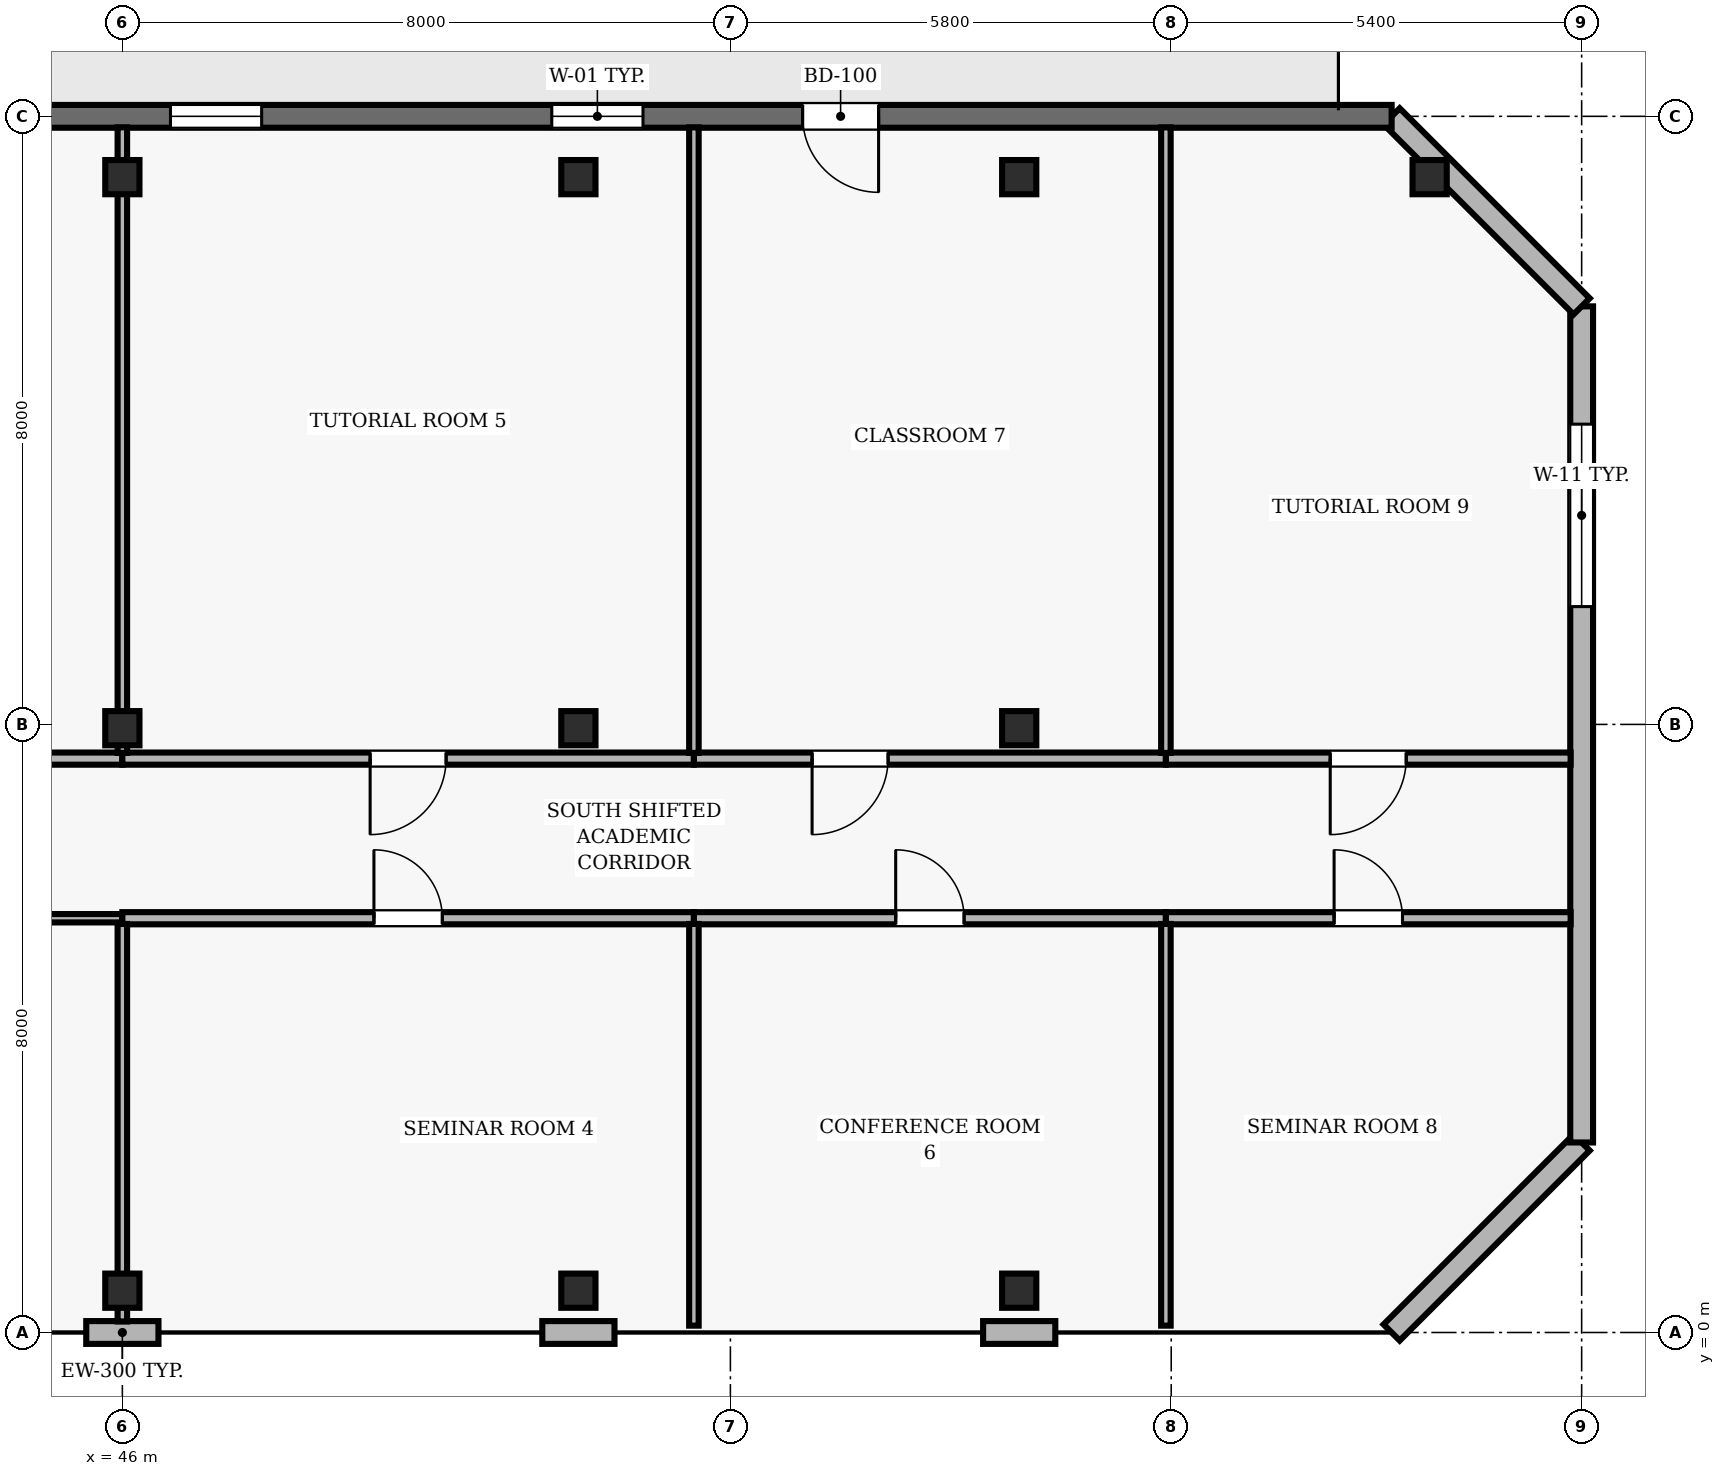
"""IFC4 building model, lengths in metres.
Left out: names, types, materials, properties, quantities, classifications, styles, units other than length and angle.
Written with IfcOpenShell. Run it as: python <this file> out.ifc"""

import sys

from ifc_helpers import new_model, si_unit, direction, frame, frame_2d, origin, origin_2d, place, context, subcontext, project, spatial, rectangle, hollow_rectangle, extrude, element, fill, save


model = new_model("IFC4")
c1 = context("Model", 3, precision=1e-05, world=origin(), true_north=direction((0.0, 1.0)))
c2 = subcontext(c1, "Body", "Model", "MODEL_VIEW")
j1 = project(units=[si_unit("LENGTHUNIT", "METRE"), si_unit("PLANEANGLEUNIT", "RADIAN")], contexts=[c1])
p1 = place(None, origin())
s1 = spatial("IfcSite", under=j1, at=p1, CompositionType="ELEMENT")
p2 = place(p1, origin())
s2 = spatial("IfcBuilding", under=s1, at=p2, CompositionType="ELEMENT")
p3 = place(p2, frame((0.0, 0.0, 230.4)))
s3 = spatial("IfcBuildingStorey", under=s2, at=p3, CompositionType="ELEMENT", Elevation=230.4)
for number, where, z_axis, x_axis in (
    (1, (46.0, 0.55, 0.0), (0.0, 0.0, 1.0), (1.0, 0.0, 0.0)),
    (2, (46.0, 7.95, 0.0), (0.0, 0.0, 1.0), (1.0, 0.0, 0.0)),
    (3, (46.0, 15.2, 0.0), (0.0, 0.0, 1.0), (1.0, 0.0, 0.0)),
    (4, (52.0, 0.55, 0.0), (0.0, 0.0, 1.0), (1.0, 0.0, 0.0)),
    (5, (52.0, 7.95, 0.0), (0.0, 0.0, 1.0), (1.0, 0.0, 0.0)),
    (6, (52.0, 15.2, 0.0), (0.0, 0.0, 1.0), (1.0, 0.0, 0.0)),
    (7, (57.8, 0.55, 0.0), (0.0, 0.0, 1.0), (1.0, 0.0, 0.0)),
    (8, (57.8, 7.95, 0.0), (0.0, 0.0, 1.0), (1.0, 0.0, 0.0)),
    (9, (57.8, 15.2, 0.0), (0.0, 0.0, 1.0), (1.0, 0.0, 0.0)),
    (10, (63.2, 15.2, 0.0), (0.0, 0.0, 1.0), (1.0, 0.0, 0.0)),
):
    element("IfcColumn", number, at=place(p3, frame(where, z_axis=z_axis, x_axis=x_axis)), inside=s3, PredefinedType="COLUMN", context=c2, shape_type="SweptSolid", body=[
        extrude(hollow_rectangle(XDim=0.45, YDim=0.45, WallThickness=0.02, at=origin_2d()), origin(), (0.0, 0.0, 1.0), 3.9),
    ])
for number, where, z_axis, x_axis in (
    (11, (45.525, 0.0, 0.0), (0.0, 0.0, 1.0), (1.0, 0.0, 0.0)),
    (12, (51.525, 0.0, 0.0), (0.0, 0.0, 1.0), (1.0, 0.0, 0.0)),
):
    element("IfcWall", number, at=place(p3, frame(where, z_axis=z_axis, x_axis=x_axis)), inside=s3, PredefinedType="SOLIDWALL", context=c2, shape_type="SweptSolid", body=[
        extrude(rectangle(XDim=0.95, YDim=0.3, at=frame_2d((0.475, 0.0))), origin(), (0.0, 0.0, 1.0), 3.69),
    ])
p4 = place(p3, frame((57.325, 0.0, 0.0), z_axis=(0.0, 0.0, 1.0), x_axis=(1.0, 0.0, 0.0)))
e13 = element("IfcWall", 13, at=p4, inside=s3, PredefinedType="SOLIDWALL", context=c2, shape_type="SweptSolid", body=[
    extrude(rectangle(XDim=0.95, YDim=0.3, at=frame_2d((0.475, 0.0))), origin(), (0.0, 0.0, 1.0), 3.69),
])
p5 = place(p3, frame((62.7, 0.0, 0.0), z_axis=(0.0, 0.0, 1.0), x_axis=(0.707106781187, 0.707106781187, 0.0)))
e14 = element("IfcWall", 14, at=p5, inside=s3, PredefinedType="SOLIDWALL", context=c2, shape_type="SweptSolid", body=[
    extrude(rectangle(XDim=3.536, YDim=0.3, at=frame_2d((1.768, 0.0))), origin(), (0.0, 0.0, 1.0), 3.69),
])
p6 = place(p3, frame((65.2, 2.5, 0.0), z_axis=(0.0, 0.0, 1.0), x_axis=(0.0, 1.0, 0.0)))
e15 = element("IfcWall", 15, at=p6, inside=s3, PredefinedType="SOLIDWALL", context=c2, shape_type="SweptSolid", body=[
    extrude(rectangle(XDim=11.0, YDim=0.3, at=frame_2d((5.5, 0.0))), origin(), (0.0, 0.0, 1.0), 3.69),
])
p7 = place(p6, frame((7.05, 0.0, 0.9)))
e16 = element("IfcOpeningElement", 16, at=p7, cuts=e15, PredefinedType="OPENING", context=c2, shape_type="SweptSolid", body=[
    extrude(rectangle(XDim=2.4, YDim=2.2, at=frame_2d((1.2, 1.1))), frame((0.0, 0.16, 0.0), z_axis=(0.0, -1.0, 0.0), x_axis=(1.0, 0.0, 0.0)), (0.0, 0.0, 1.0), 0.32),
])
p8 = place(p3, frame((65.2, 13.5, 0.0), z_axis=(0.0, 0.0, 1.0), x_axis=(-0.707106781187, 0.707106781187, 0.0)))
e17 = element("IfcWall", 17, at=p8, inside=s3, PredefinedType="SOLIDWALL", context=c2, shape_type="SweptSolid", body=[
    extrude(rectangle(XDim=3.536, YDim=0.3, at=frame_2d((1.768, 0.0))), origin(), (0.0, 0.0, 1.0), 3.69),
])
p9 = place(p3, frame((62.7, 16.0, 0.0), z_axis=(0.0, 0.0, 1.0), x_axis=(-1.0, 0.0, 0.0)))
e18 = element("IfcWall", 18, at=p9, inside=s3, PredefinedType="SOLIDWALL", context=c2, shape_type="SweptSolid", body=[
    extrude(rectangle(XDim=19.1, YDim=0.3, at=frame_2d((9.55, 0.0))), origin(), (0.0, 0.0, 1.0), 3.69),
])
p10 = place(p9, frame((6.75, 0.0, 0.0)))
e19 = element("IfcOpeningElement", 19, at=p10, cuts=e18, PredefinedType="OPENING", context=c2, shape_type="SweptSolid", body=[
    extrude(rectangle(XDim=1.0, YDim=2.2, at=frame_2d((0.5, 1.1))), frame((0.0, 0.16, 0.0), z_axis=(0.0, -1.0, 0.0), x_axis=(1.0, 0.0, 0.0)), (0.0, 0.0, 1.0), 0.32),
])
p11 = place(p9, frame((9.85, 0.0, 0.9)))
e20 = element("IfcOpeningElement", 20, at=p11, cuts=e18, PredefinedType="OPENING", context=c2, shape_type="SweptSolid", body=[
    extrude(rectangle(XDim=1.2, YDim=1.6, at=frame_2d((0.6, 0.8))), frame((0.0, 0.16, 0.0), z_axis=(0.0, -1.0, 0.0), x_axis=(1.0, 0.0, 0.0)), (0.0, 0.0, 1.0), 0.32),
])
p12 = place(p9, frame((14.867, 0.0, 0.9)))
e21 = element("IfcOpeningElement", 21, at=p12, cuts=e18, PredefinedType="OPENING", context=c2, shape_type="SweptSolid", body=[
    extrude(rectangle(XDim=1.2, YDim=1.6, at=frame_2d((0.6, 0.8))), frame((0.0, 0.16, 0.0), z_axis=(0.0, -1.0, 0.0), x_axis=(1.0, 0.0, 0.0)), (0.0, 0.0, 1.0), 0.32),
])
p13 = place(p3, frame((40.35, 5.45, 0.0), z_axis=(0.0, 0.0, 1.0), x_axis=(1.0, 0.0, 0.0)))
e22 = element("IfcWall", 22, at=p13, inside=s3, PredefinedType="MOVABLE", context=c2, shape_type="SweptSolid", body=[
    extrude(rectangle(XDim=5.65, YDim=0.11, at=frame_2d((2.825, 0.0))), origin(), (0.0, 0.0, 1.0), 3.343),
])
p14 = place(p13, frame((2.375, 0.0, 0.0)))
e23 = element("IfcOpeningElement", 23, at=p14, cuts=e22, PredefinedType="OPENING", context=c2, shape_type="SweptSolid", body=[
    extrude(rectangle(XDim=0.9, YDim=2.1, at=frame_2d((0.45, 1.05))), frame((0.0, 0.065, 0.0), z_axis=(0.0, -1.0, 0.0), x_axis=(1.0, 0.0, 0.0)), (0.0, 0.0, 1.0), 0.13),
])
p15 = place(p3, frame((46.0, 5.45, 0.0), z_axis=(0.0, 0.0, 1.0), x_axis=(1.0, 0.0, 0.0)))
e24 = element("IfcWall", 24, at=p15, inside=s3, PredefinedType="PARTITIONING", context=c2, shape_type="SweptSolid", body=[
    extrude(rectangle(XDim=7.52, YDim=0.16, at=frame_2d((3.76, 0.0))), origin(), (0.0, 0.0, 1.0), 3.343),
])
p16 = place(p15, frame((3.31, 0.0, 0.0)))
e25 = element("IfcOpeningElement", 25, at=p16, cuts=e24, PredefinedType="OPENING", context=c2, shape_type="SweptSolid", body=[
    extrude(rectangle(XDim=0.9, YDim=2.1, at=frame_2d((0.45, 1.05))), frame((0.0, 0.09, 0.0), z_axis=(0.0, -1.0, 0.0), x_axis=(1.0, 0.0, 0.0)), (0.0, 0.0, 1.0), 0.18),
])
p17 = place(p3, frame((46.0, 7.55, 0.0), z_axis=(0.0, 0.0, 1.0), x_axis=(-1.0, 0.0, 0.0)))
e26 = element("IfcWall", 26, at=p17, inside=s3, PredefinedType="PARTITIONING", context=c2, shape_type="SweptSolid", body=[
    extrude(rectangle(XDim=5.65, YDim=0.16, at=frame_2d((2.825, 0.0))), origin(), (0.0, 0.0, 1.0), 3.139),
])
p18 = place(p3, frame((53.52, 5.45, 0.0), z_axis=(0.0, 0.0, 1.0), x_axis=(1.0, 0.0, 0.0)))
e27 = element("IfcWall", 27, at=p18, inside=s3, PredefinedType="PARTITIONING", context=c2, shape_type="SweptSolid", body=[
    extrude(rectangle(XDim=6.21, YDim=0.16, at=frame_2d((3.105, 0.0))), origin(), (0.0, 0.0, 1.0), 3.343),
])
p19 = place(p18, frame((2.655, 0.0, 0.0)))
e28 = element("IfcOpeningElement", 28, at=p19, cuts=e27, PredefinedType="OPENING", context=c2, shape_type="SweptSolid", body=[
    extrude(rectangle(XDim=0.9, YDim=2.1, at=frame_2d((0.45, 1.05))), frame((0.0, 0.09, 0.0), z_axis=(0.0, -1.0, 0.0), x_axis=(1.0, 0.0, 0.0)), (0.0, 0.0, 1.0), 0.18),
])
p20 = place(p3, frame((53.52, 7.55, 0.0), z_axis=(0.0, 0.0, 1.0), x_axis=(-1.0, 0.0, 0.0)))
e29 = element("IfcWall", 29, at=p20, inside=s3, PredefinedType="PARTITIONING", context=c2, shape_type="SweptSolid", body=[
    extrude(rectangle(XDim=7.52, YDim=0.16, at=frame_2d((3.76, 0.0))), origin(), (0.0, 0.0, 1.0), 3.139),
])
p21 = place(p20, frame((3.26, 0.0, 0.0)))
e30 = element("IfcOpeningElement", 30, at=p21, cuts=e29, PredefinedType="OPENING", context=c2, shape_type="SweptSolid", body=[
    extrude(rectangle(XDim=1.0, YDim=2.1, at=frame_2d((0.5, 1.05))), frame((0.0, 0.09, 0.0), z_axis=(0.0, -1.0, 0.0), x_axis=(1.0, 0.0, 0.0)), (0.0, 0.0, 1.0), 0.18),
])
p22 = place(p3, frame((59.73, 5.45, 0.0), z_axis=(0.0, 0.0, 1.0), x_axis=(1.0, 0.0, 0.0)))
e31 = element("IfcWall", 31, at=p22, inside=s3, PredefinedType="PARTITIONING", context=c2, shape_type="SweptSolid", body=[
    extrude(rectangle(XDim=5.325, YDim=0.16, at=frame_2d((2.663, 0.0))), origin(), (0.0, 0.0, 1.0), 3.69),
])
p23 = place(p22, frame((2.213, 0.0, 0.0)))
e32 = element("IfcOpeningElement", 32, at=p23, cuts=e31, PredefinedType="OPENING", context=c2, shape_type="SweptSolid", body=[
    extrude(rectangle(XDim=0.9, YDim=2.1, at=frame_2d((0.45, 1.05))), frame((0.0, 0.09, 0.0), z_axis=(0.0, -1.0, 0.0), x_axis=(1.0, 0.0, 0.0)), (0.0, 0.0, 1.0), 0.18),
])
p24 = place(p3, frame((59.73, 7.55, 0.0), z_axis=(0.0, 0.0, 1.0), x_axis=(-1.0, 0.0, 0.0)))
e33 = element("IfcWall", 33, at=p24, inside=s3, PredefinedType="PARTITIONING", context=c2, shape_type="SweptSolid", body=[
    extrude(rectangle(XDim=6.21, YDim=0.16, at=frame_2d((3.105, 0.0))), origin(), (0.0, 0.0, 1.0), 3.139),
])
p25 = place(p24, frame((3.655, 0.0, 0.0)))
e34 = element("IfcOpeningElement", 34, at=p25, cuts=e33, PredefinedType="OPENING", context=c2, shape_type="SweptSolid", body=[
    extrude(rectangle(XDim=1.0, YDim=2.1, at=frame_2d((0.5, 1.05))), frame((0.0, 0.09, 0.0), z_axis=(0.0, -1.0, 0.0), x_axis=(1.0, 0.0, 0.0)), (0.0, 0.0, 1.0), 0.18),
])
p26 = place(p3, frame((65.055, 7.55, 0.0), z_axis=(0.0, 0.0, 1.0), x_axis=(-1.0, 0.0, 0.0)))
e35 = element("IfcWall", 35, at=p26, inside=s3, PredefinedType="PARTITIONING", context=c2, shape_type="SweptSolid", body=[
    extrude(rectangle(XDim=5.325, YDim=0.16, at=frame_2d((2.663, 0.0))), origin(), (0.0, 0.0, 1.0), 3.69),
])
p27 = place(p26, frame((2.163, 0.0, 0.0)))
e36 = element("IfcOpeningElement", 36, at=p27, cuts=e35, PredefinedType="OPENING", context=c2, shape_type="SweptSolid", body=[
    extrude(rectangle(XDim=1.0, YDim=2.1, at=frame_2d((0.5, 1.05))), frame((0.0, 0.09, 0.0), z_axis=(0.0, -1.0, 0.0), x_axis=(1.0, 0.0, 0.0)), (0.0, 0.0, 1.0), 0.18),
])
p28 = place(p3, frame((46.0, 0.145, 0.0), z_axis=(0.0, 0.0, 1.0), x_axis=(0.0, 1.0, 0.0)))
e37 = element("IfcWall", 37, at=p28, inside=s3, PredefinedType="PARTITIONING", context=c2, shape_type="SweptSolid", body=[
    extrude(rectangle(XDim=5.23, YDim=0.125, at=frame_2d((2.615, 0.0))), origin(), (0.0, 0.0, 1.0), 3.139),
])
p29 = place(p3, frame((46.0, 7.625, 0.0), z_axis=(0.0, 0.0, 1.0), x_axis=(0.0, 1.0, 0.0)))
e38 = element("IfcWall", 38, at=p29, inside=s3, PredefinedType="PARTITIONING", context=c2, shape_type="SweptSolid", body=[
    extrude(rectangle(XDim=8.23, YDim=0.125, at=frame_2d((4.115, 0.0))), origin(), (0.0, 0.0, 1.0), 3.139),
])
p30 = place(p3, frame((53.52, 0.09, 0.0), z_axis=(0.0, 0.0, 1.0), x_axis=(0.0, 1.0, 0.0)))
e39 = element("IfcWall", 39, at=p30, inside=s3, PredefinedType="PARTITIONING", context=c2, shape_type="SweptSolid", body=[
    extrude(rectangle(XDim=5.285, YDim=0.125, at=frame_2d((2.643, 0.0))), origin(), (0.0, 0.0, 1.0), 3.69),
])
p31 = place(p3, frame((53.52, 7.625, 0.0), z_axis=(0.0, 0.0, 1.0), x_axis=(0.0, 1.0, 0.0)))
e40 = element("IfcWall", 40, at=p31, inside=s3, PredefinedType="PARTITIONING", context=c2, shape_type="SweptSolid", body=[
    extrude(rectangle(XDim=8.23, YDim=0.125, at=frame_2d((4.115, 0.0))), origin(), (0.0, 0.0, 1.0), 3.69),
])
p32 = place(p3, frame((59.73, 0.09, 0.0), z_axis=(0.0, 0.0, 1.0), x_axis=(0.0, 1.0, 0.0)))
e41 = element("IfcWall", 41, at=p32, inside=s3, PredefinedType="PARTITIONING", context=c2, shape_type="SweptSolid", body=[
    extrude(rectangle(XDim=5.285, YDim=0.125, at=frame_2d((2.643, 0.0))), origin(), (0.0, 0.0, 1.0), 3.69),
])
p33 = place(p3, frame((59.73, 7.625, 0.0), z_axis=(0.0, 0.0, 1.0), x_axis=(0.0, 1.0, 0.0)))
e42 = element("IfcWall", 42, at=p33, inside=s3, PredefinedType="PARTITIONING", context=c2, shape_type="SweptSolid", body=[
    extrude(rectangle(XDim=8.23, YDim=0.125, at=frame_2d((4.115, 0.0))), origin(), (0.0, 0.0, 1.0), 3.69),
])
p34 = place(p7, origin())
e43 = element("IfcWindow", 43, at=p34, inside=s3, PartitioningType="SINGLE_PANEL", PredefinedType="WINDOW", context=c2, shape_type="SweptSolid", body=[
    extrude(rectangle(XDim=2.4, YDim=2.2, at=frame_2d((1.2, 1.1))), frame((0.0, 0.03, 0.0), z_axis=(0.0, -1.0, 0.0), x_axis=(1.0, 0.0, 0.0)), (0.0, 0.0, 1.0), 0.06),
])
fill(e16, e43)
p35 = place(p10, origin())
e44 = element("IfcDoor", 44, at=p35, inside=s3, OperationType="SINGLE_SWING_LEFT", PredefinedType="DOOR", context=c2, shape_type="SweptSolid", body=[
    extrude(rectangle(XDim=1.0, YDim=2.2, at=frame_2d((0.5, 1.1))), frame((0.0, 0.025, 0.0), z_axis=(0.0, -1.0, 0.0), x_axis=(1.0, 0.0, 0.0)), (0.0, 0.0, 1.0), 0.05),
])
fill(e19, e44)
p36 = place(p11, origin())
e45 = element("IfcWindow", 45, at=p36, inside=s3, PartitioningType="SINGLE_PANEL", PredefinedType="WINDOW", context=c2, shape_type="SweptSolid", body=[
    extrude(rectangle(XDim=1.2, YDim=1.6, at=frame_2d((0.6, 0.8))), frame((0.0, 0.03, 0.0), z_axis=(0.0, -1.0, 0.0), x_axis=(1.0, 0.0, 0.0)), (0.0, 0.0, 1.0), 0.06),
])
fill(e20, e45)
p37 = place(p12, origin())
e46 = element("IfcWindow", 46, at=p37, inside=s3, PartitioningType="SINGLE_PANEL", PredefinedType="WINDOW", context=c2, shape_type="SweptSolid", body=[
    extrude(rectangle(XDim=1.2, YDim=1.6, at=frame_2d((0.6, 0.8))), frame((0.0, 0.03, 0.0), z_axis=(0.0, -1.0, 0.0), x_axis=(1.0, 0.0, 0.0)), (0.0, 0.0, 1.0), 0.06),
])
fill(e21, e46)
p38 = place(p16, origin())
e47 = element("IfcDoor", 47, at=p38, inside=s3, OperationType="SINGLE_SWING_LEFT", PredefinedType="DOOR", context=c2, shape_type="SweptSolid", body=[
    extrude(rectangle(XDim=0.9, YDim=2.1, at=frame_2d((0.45, 1.05))), frame((0.0, 0.025, 0.0), z_axis=(0.0, -1.0, 0.0), x_axis=(1.0, 0.0, 0.0)), (0.0, 0.0, 1.0), 0.05),
])
fill(e25, e47)
p39 = place(p21, origin())
e48 = element("IfcDoor", 48, at=p39, inside=s3, OperationType="SINGLE_SWING_RIGHT", PredefinedType="DOOR", context=c2, shape_type="SweptSolid", body=[
    extrude(rectangle(XDim=1.0, YDim=2.1, at=frame_2d((0.5, 1.05))), frame((0.0, 0.025, 0.0), z_axis=(0.0, -1.0, 0.0), x_axis=(1.0, 0.0, 0.0)), (0.0, 0.0, 1.0), 0.05),
])
fill(e30, e48)
p40 = place(p19, origin())
e49 = element("IfcDoor", 49, at=p40, inside=s3, OperationType="SINGLE_SWING_LEFT", PredefinedType="DOOR", context=c2, shape_type="SweptSolid", body=[
    extrude(rectangle(XDim=0.9, YDim=2.1, at=frame_2d((0.45, 1.05))), frame((0.0, 0.025, 0.0), z_axis=(0.0, -1.0, 0.0), x_axis=(1.0, 0.0, 0.0)), (0.0, 0.0, 1.0), 0.05),
])
fill(e28, e49)
p41 = place(p25, origin())
e50 = element("IfcDoor", 50, at=p41, inside=s3, OperationType="SINGLE_SWING_RIGHT", PredefinedType="DOOR", context=c2, shape_type="SweptSolid", body=[
    extrude(rectangle(XDim=1.0, YDim=2.1, at=frame_2d((0.5, 1.05))), frame((0.0, 0.025, 0.0), z_axis=(0.0, -1.0, 0.0), x_axis=(1.0, 0.0, 0.0)), (0.0, 0.0, 1.0), 0.05),
])
fill(e34, e50)
p42 = place(p23, origin())
e51 = element("IfcDoor", 51, at=p42, inside=s3, OperationType="SINGLE_SWING_LEFT", PredefinedType="DOOR", context=c2, shape_type="SweptSolid", body=[
    extrude(rectangle(XDim=0.9, YDim=2.1, at=frame_2d((0.45, 1.05))), frame((0.0, 0.025, 0.0), z_axis=(0.0, -1.0, 0.0), x_axis=(1.0, 0.0, 0.0)), (0.0, 0.0, 1.0), 0.05),
])
fill(e32, e51)
p43 = place(p27, origin())
e52 = element("IfcDoor", 52, at=p43, inside=s3, OperationType="SINGLE_SWING_RIGHT", PredefinedType="DOOR", context=c2, shape_type="SweptSolid", body=[
    extrude(rectangle(XDim=1.0, YDim=2.1, at=frame_2d((0.5, 1.05))), frame((0.0, 0.025, 0.0), z_axis=(0.0, -1.0, 0.0), x_axis=(1.0, 0.0, 0.0)), (0.0, 0.0, 1.0), 0.05),
])
fill(e36, e52)
save(model, sys.argv[1])
